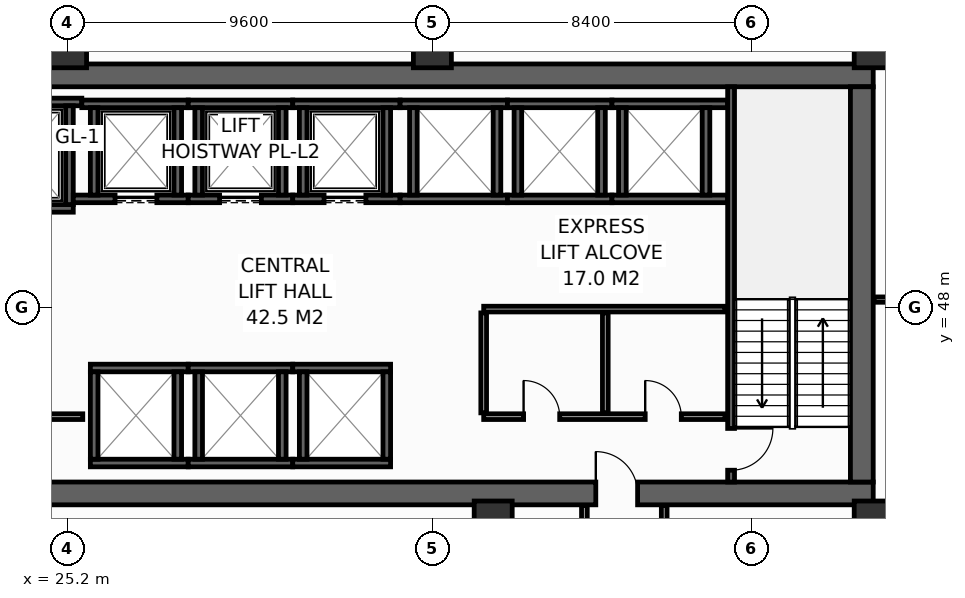
"""IFC4 building model, lengths in metres.
Left out: names, types, materials, properties, quantities, classifications, styles, units other than length and angle.
Written with IfcOpenShell. Run it as: python <this file> out.ifc"""

import sys

from ifc_helpers import new_model, si_unit, direction, frame, frame_2d, origin, origin_2d, place, context, subcontext, project, spatial, rectangle, hollow_rectangle, extrude, element, fill, save


model = new_model("IFC4")
c1 = context("Model", 3, precision=1e-05, world=origin(), true_north=direction((0.0, 1.0)))
c2 = subcontext(c1, "Body", "Model", "MODEL_VIEW")
j1 = project(units=[si_unit("LENGTHUNIT", "METRE"), si_unit("PLANEANGLEUNIT", "RADIAN")], contexts=[c1])
p1 = place(None, origin())
s1 = spatial("IfcSite", under=j1, at=p1, CompositionType="ELEMENT")
p2 = place(p1, origin())
s2 = spatial("IfcBuilding", under=s1, at=p2, CompositionType="ELEMENT")
p3 = place(p2, frame((0.0, 0.0, 101.6)))
s3 = spatial("IfcBuildingStorey", under=s2, at=p3, CompositionType="ELEMENT", Elevation=101.6)
p4 = place(p3, frame((13.5, 43.1, 0.0), z_axis=(0.0, 0.0, 1.0), x_axis=(1.0, 0.0, 0.0)))
e1 = element("IfcWall", 1, at=p4, inside=s3, PredefinedType="SHEAR", context=c2, shape_type="SweptSolid", body=[
    extrude(rectangle(XDim=32.9, YDim=0.6, at=frame_2d((16.45, 0.0))), origin(), (0.0, 0.0, 1.0), 4.15),
])
p5 = place(p4, frame((5.4, 0.0, 0.0)))
e2 = element("IfcOpeningElement", 2, at=p5, cuts=e1, PredefinedType="OPENING", context=c2, shape_type="SweptSolid", body=[
    extrude(rectangle(XDim=1.1, YDim=2.15, at=frame_2d((0.55, 1.075))), frame((0.0, 0.31, 0.0), z_axis=(0.0, -1.0, 0.0), x_axis=(1.0, 0.0, 0.0)), (0.0, 0.0, 1.0), 0.62),
])
p6 = place(p4, frame((25.6, 0.0, 0.0)))
e3 = element("IfcOpeningElement", 3, at=p6, cuts=e1, PredefinedType="OPENING", context=c2, shape_type="SweptSolid", body=[
    extrude(rectangle(XDim=1.1, YDim=2.15, at=frame_2d((0.55, 1.075))), frame((0.0, 0.31, 0.0), z_axis=(0.0, -1.0, 0.0), x_axis=(1.0, 0.0, 0.0)), (0.0, 0.0, 1.0), 0.62),
])
p7 = place(p3, frame((13.5, 54.1, 0.0), z_axis=(0.0, 0.0, 1.0), x_axis=(1.0, 0.0, 0.0)))
e4 = element("IfcWall", 4, at=p7, inside=s3, PredefinedType="SHEAR", context=c2, shape_type="SweptSolid", body=[
    extrude(rectangle(XDim=32.9, YDim=0.6, at=frame_2d((16.45, 0.0))), origin(), (0.0, 0.0, 1.0), 4.15),
])
p8 = place(p3, frame((46.1, 43.4, 0.0), z_axis=(0.0, 0.0, 1.0), x_axis=(0.0, 1.0, 0.0)))
e5 = element("IfcWall", 5, at=p8, inside=s3, PredefinedType="SHEAR", context=c2, shape_type="SweptSolid", body=[
    extrude(rectangle(XDim=10.4, YDim=0.6, at=frame_2d((5.2, 0.0))), origin(), (0.0, 0.0, 1.0), 4.15),
])
for number, where, z_axis, x_axis in (
    (6, (25.2, 54.8, 0.0), (0.0, 0.0, 1.0), (1.0, 0.0, 0.0)),
    (7, (34.8, 54.8, 0.0), (0.0, 0.0, 1.0), (1.0, 0.0, 0.0)),
    (8, (46.4, 54.8, 0.0), (0.0, 0.0, 1.0), (1.0, 0.0, 0.0)),
    (9, (36.4, 42.4, 0.0), (0.0, 0.0, 1.0), (1.0, 0.0, 0.0)),
    (10, (46.4, 42.4, 0.0), (0.0, 0.0, 1.0), (1.0, 0.0, 0.0)),
):
    element("IfcColumn", number, at=place(p3, frame(where, z_axis=z_axis, x_axis=x_axis)), inside=s3, PredefinedType="COLUMN", context=c2, shape_type="SweptSolid", body=[
        extrude(hollow_rectangle(XDim=1.0, YDim=1.0, WallThickness=0.045, at=origin_2d()), origin(), (0.0, 0.0, 1.0), 4.4),
    ])
p9 = place(p3, frame((22.5, 50.6, 0.0), z_axis=(0.0, 0.0, 1.0), x_axis=(1.0, 0.0, 0.0)))
e11 = element("IfcWall", 11, at=p9, inside=s3, PredefinedType="SHEAR", context=c2, shape_type="SweptSolid", body=[
    extrude(rectangle(XDim=2.85, YDim=0.2, at=frame_2d((1.425, 0.0))), origin(), (0.0, 0.0, 1.0), 4.15),
])
p10 = place(p9, frame((0.925, 0.0, 0.0)))
e12 = element("IfcOpeningElement", 12, at=p10, cuts=e11, PredefinedType="OPENING", context=c2, shape_type="SweptSolid", body=[
    extrude(rectangle(XDim=1.25, YDim=2.3, at=frame_2d((0.625, 1.15))), frame((0.0, 0.11, 0.0), z_axis=(0.0, -1.0, 0.0), x_axis=(1.0, 0.0, 0.0)), (0.0, 0.0, 1.0), 0.22),
])
p11 = place(p3, frame((22.5, 53.4, 0.0), z_axis=(0.0, 0.0, 1.0), x_axis=(1.0, 0.0, 0.0)))
e13 = element("IfcWall", 13, at=p11, inside=s3, PredefinedType="SHEAR", context=c2, shape_type="SweptSolid", body=[
    extrude(rectangle(XDim=3.075, YDim=0.2, at=frame_2d((1.538, 0.0))), origin(), (0.0, 0.0, 1.0), 4.15),
])
p12 = place(p3, frame((25.25, 50.7, 0.0), z_axis=(0.0, 0.0, 1.0), x_axis=(0.0, 1.0, 0.0)))
e14 = element("IfcWall", 14, at=p12, inside=s3, PredefinedType="SHEAR", context=c2, shape_type="SweptSolid", body=[
    extrude(rectangle(XDim=2.6, YDim=0.2, at=frame_2d((1.3, 0.0))), origin(), (0.0, 0.0, 1.0), 4.15),
])
p13 = place(p3, frame((25.35, 50.85, 0.0), z_axis=(0.0, 0.0, 1.0), x_axis=(1.0, 0.0, 0.0)))
e15 = element("IfcWall", 15, at=p13, inside=s3, PredefinedType="SHEAR", context=c2, shape_type="SweptSolid", body=[
    extrude(rectangle(XDim=3.025, YDim=0.2, at=frame_2d((1.512, 0.0))), origin(), (0.0, 0.0, 1.0), 4.15),
])
p14 = place(p13, frame((1.1, 0.0, 0.0)))
e16 = element("IfcOpeningElement", 16, at=p14, cuts=e15, PredefinedType="OPENING", context=c2, shape_type="SweptSolid", body=[
    extrude(rectangle(XDim=1.1, YDim=2.2, at=frame_2d((0.55, 1.1))), frame((0.0, 0.11, 0.0), z_axis=(0.0, -1.0, 0.0), x_axis=(1.0, 0.0, 0.0)), (0.0, 0.0, 1.0), 0.22),
])
p15 = place(p3, frame((25.575, 53.35, 0.0), z_axis=(0.0, 0.0, 1.0), x_axis=(1.0, 0.0, 0.0)))
e17 = element("IfcWall", 17, at=p15, inside=s3, PredefinedType="SHEAR", context=c2, shape_type="SweptSolid", body=[
    extrude(rectangle(XDim=2.8, YDim=0.2, at=frame_2d((1.4, 0.0))), origin(), (0.0, 0.0, 1.0), 4.15),
])
for number, where, z_axis, x_axis in (
    (18, (25.9, 50.95, 0.0), (0.0, 0.0, 1.0), (0.0, 1.0, 0.0)),
    (19, (28.1, 50.95, 0.0), (0.0, 0.0, 1.0), (0.0, 1.0, 0.0)),
):
    element("IfcWall", number, at=place(p3, frame(where, z_axis=z_axis, x_axis=x_axis)), inside=s3, PredefinedType="SHEAR", context=c2, shape_type="SweptSolid", body=[
        extrude(rectangle(XDim=2.3, YDim=0.2, at=frame_2d((1.15, 0.0))), origin(), (0.0, 0.0, 1.0), 4.15),
    ])
p16 = place(p3, frame((28.375, 50.85, 0.0), z_axis=(0.0, 0.0, 1.0), x_axis=(1.0, 0.0, 0.0)))
e20 = element("IfcWall", 20, at=p16, inside=s3, PredefinedType="SHEAR", context=c2, shape_type="SweptSolid", body=[
    extrude(rectangle(XDim=2.75, YDim=0.2, at=frame_2d((1.375, 0.0))), origin(), (0.0, 0.0, 1.0), 4.15),
])
p17 = place(p16, frame((0.825, 0.0, 0.0)))
e21 = element("IfcOpeningElement", 21, at=p17, cuts=e20, PredefinedType="OPENING", context=c2, shape_type="SweptSolid", body=[
    extrude(rectangle(XDim=1.1, YDim=2.2, at=frame_2d((0.55, 1.1))), frame((0.0, 0.11, 0.0), z_axis=(0.0, -1.0, 0.0), x_axis=(1.0, 0.0, 0.0)), (0.0, 0.0, 1.0), 0.22),
])
p18 = place(p3, frame((28.375, 53.35, 0.0), z_axis=(0.0, 0.0, 1.0), x_axis=(1.0, 0.0, 0.0)))
e22 = element("IfcWall", 22, at=p18, inside=s3, PredefinedType="SHEAR", context=c2, shape_type="SweptSolid", body=[
    extrude(rectangle(XDim=2.75, YDim=0.2, at=frame_2d((1.375, 0.0))), origin(), (0.0, 0.0, 1.0), 4.15),
])
for number, where, z_axis, x_axis in (
    (23, (28.65, 50.95, 0.0), (0.0, 0.0, 1.0), (0.0, 1.0, 0.0)),
    (24, (30.85, 50.95, 0.0), (0.0, 0.0, 1.0), (0.0, 1.0, 0.0)),
):
    element("IfcWall", number, at=place(p3, frame(where, z_axis=z_axis, x_axis=x_axis)), inside=s3, PredefinedType="SHEAR", context=c2, shape_type="SweptSolid", body=[
        extrude(rectangle(XDim=2.3, YDim=0.2, at=frame_2d((1.15, 0.0))), origin(), (0.0, 0.0, 1.0), 4.15),
    ])
p19 = place(p3, frame((31.125, 50.85, 0.0), z_axis=(0.0, 0.0, 1.0), x_axis=(1.0, 0.0, 0.0)))
e25 = element("IfcWall", 25, at=p19, inside=s3, PredefinedType="SHEAR", context=c2, shape_type="SweptSolid", body=[
    extrude(rectangle(XDim=2.825, YDim=0.2, at=frame_2d((1.413, 0.0))), origin(), (0.0, 0.0, 1.0), 4.15),
])
p20 = place(p19, frame((0.825, 0.0, 0.0)))
e26 = element("IfcOpeningElement", 26, at=p20, cuts=e25, PredefinedType="OPENING", context=c2, shape_type="SweptSolid", body=[
    extrude(rectangle(XDim=1.1, YDim=2.2, at=frame_2d((0.55, 1.1))), frame((0.0, 0.11, 0.0), z_axis=(0.0, -1.0, 0.0), x_axis=(1.0, 0.0, 0.0)), (0.0, 0.0, 1.0), 0.22),
])
p21 = place(p3, frame((31.125, 53.35, 0.0), z_axis=(0.0, 0.0, 1.0), x_axis=(1.0, 0.0, 0.0)))
e27 = element("IfcWall", 27, at=p21, inside=s3, PredefinedType="SHEAR", context=c2, shape_type="SweptSolid", body=[
    extrude(rectangle(XDim=2.825, YDim=0.2, at=frame_2d((1.413, 0.0))), origin(), (0.0, 0.0, 1.0), 4.15),
])
for number, where, z_axis, x_axis in (
    (28, (31.4, 50.95, 0.0), (0.0, 0.0, 1.0), (0.0, 1.0, 0.0)),
    (29, (33.6, 50.95, 0.0), (0.0, 0.0, 1.0), (0.0, 1.0, 0.0)),
):
    element("IfcWall", number, at=place(p3, frame(where, z_axis=z_axis, x_axis=x_axis)), inside=s3, PredefinedType="SHEAR", context=c2, shape_type="SweptSolid", body=[
        extrude(rectangle(XDim=2.3, YDim=0.2, at=frame_2d((1.15, 0.0))), origin(), (0.0, 0.0, 1.0), 4.15),
    ])
for number, where, z_axis, x_axis in (
    (30, (25.8, 43.9, 0.0), (0.0, 0.0, 1.0), (1.0, 0.0, 0.0)),
    (31, (25.8, 46.4, 0.0), (0.0, 0.0, 1.0), (1.0, 0.0, 0.0)),
):
    element("IfcWall", number, at=place(p3, frame(where, z_axis=z_axis, x_axis=x_axis)), inside=s3, PredefinedType="SHEAR", context=c2, shape_type="SweptSolid", body=[
        extrude(rectangle(XDim=2.575, YDim=0.2, at=frame_2d((1.288, 0.0))), origin(), (0.0, 0.0, 1.0), 4.15),
    ])
for number, where, z_axis, x_axis in (
    (32, (25.9, 44.0, 0.0), (0.0, 0.0, 1.0), (0.0, 1.0, 0.0)),
    (33, (28.1, 44.0, 0.0), (0.0, 0.0, 1.0), (0.0, 1.0, 0.0)),
):
    element("IfcWall", number, at=place(p3, frame(where, z_axis=z_axis, x_axis=x_axis)), inside=s3, PredefinedType="SHEAR", context=c2, shape_type="SweptSolid", body=[
        extrude(rectangle(XDim=2.3, YDim=0.2, at=frame_2d((1.15, 0.0))), origin(), (0.0, 0.0, 1.0), 4.15),
    ])
for number, where, z_axis, x_axis in (
    (34, (28.375, 43.9, 0.0), (0.0, 0.0, 1.0), (1.0, 0.0, 0.0)),
    (35, (28.375, 46.4, 0.0), (0.0, 0.0, 1.0), (1.0, 0.0, 0.0)),
):
    element("IfcWall", number, at=place(p3, frame(where, z_axis=z_axis, x_axis=x_axis)), inside=s3, PredefinedType="SHEAR", context=c2, shape_type="SweptSolid", body=[
        extrude(rectangle(XDim=2.75, YDim=0.2, at=frame_2d((1.375, 0.0))), origin(), (0.0, 0.0, 1.0), 4.15),
    ])
for number, where, z_axis, x_axis in (
    (36, (28.65, 44.0, 0.0), (0.0, 0.0, 1.0), (0.0, 1.0, 0.0)),
    (37, (30.85, 44.0, 0.0), (0.0, 0.0, 1.0), (0.0, 1.0, 0.0)),
):
    element("IfcWall", number, at=place(p3, frame(where, z_axis=z_axis, x_axis=x_axis)), inside=s3, PredefinedType="SHEAR", context=c2, shape_type="SweptSolid", body=[
        extrude(rectangle(XDim=2.3, YDim=0.2, at=frame_2d((1.15, 0.0))), origin(), (0.0, 0.0, 1.0), 4.15),
    ])
for number, where, z_axis, x_axis in (
    (38, (31.125, 43.9, 0.0), (0.0, 0.0, 1.0), (1.0, 0.0, 0.0)),
    (39, (31.125, 46.4, 0.0), (0.0, 0.0, 1.0), (1.0, 0.0, 0.0)),
):
    element("IfcWall", number, at=place(p3, frame(where, z_axis=z_axis, x_axis=x_axis)), inside=s3, PredefinedType="SHEAR", context=c2, shape_type="SweptSolid", body=[
        extrude(rectangle(XDim=2.575, YDim=0.2, at=frame_2d((1.288, 0.0))), origin(), (0.0, 0.0, 1.0), 4.15),
    ])
for number, where, z_axis, x_axis in (
    (40, (31.4, 44.0, 0.0), (0.0, 0.0, 1.0), (0.0, 1.0, 0.0)),
    (41, (33.6, 44.0, 0.0), (0.0, 0.0, 1.0), (0.0, 1.0, 0.0)),
):
    element("IfcWall", number, at=place(p3, frame(where, z_axis=z_axis, x_axis=x_axis)), inside=s3, PredefinedType="SHEAR", context=c2, shape_type="SweptSolid", body=[
        extrude(rectangle(XDim=2.3, YDim=0.2, at=frame_2d((1.15, 0.0))), origin(), (0.0, 0.0, 1.0), 4.15),
    ])
for number, where, z_axis, x_axis in (
    (42, (33.95, 50.85, 0.0), (0.0, 0.0, 1.0), (1.0, 0.0, 0.0)),
    (43, (33.95, 53.35, 0.0), (0.0, 0.0, 1.0), (1.0, 0.0, 0.0)),
):
    element("IfcWall", number, at=place(p3, frame(where, z_axis=z_axis, x_axis=x_axis)), inside=s3, PredefinedType="SHEAR", context=c2, shape_type="SweptSolid", body=[
        extrude(rectangle(XDim=2.825, YDim=0.2, at=frame_2d((1.413, 0.0))), origin(), (0.0, 0.0, 1.0), 4.15),
    ])
for number, where, z_axis, x_axis in (
    (44, (34.3, 50.95, 0.0), (0.0, 0.0, 1.0), (0.0, 1.0, 0.0)),
    (45, (36.5, 50.95, 0.0), (0.0, 0.0, 1.0), (0.0, 1.0, 0.0)),
):
    element("IfcWall", number, at=place(p3, frame(where, z_axis=z_axis, x_axis=x_axis)), inside=s3, PredefinedType="SHEAR", context=c2, shape_type="SweptSolid", body=[
        extrude(rectangle(XDim=2.3, YDim=0.2, at=frame_2d((1.15, 0.0))), origin(), (0.0, 0.0, 1.0), 4.15),
    ])
for number, where, z_axis, x_axis in (
    (46, (36.775, 50.85, 0.0), (0.0, 0.0, 1.0), (1.0, 0.0, 0.0)),
    (47, (36.775, 53.35, 0.0), (0.0, 0.0, 1.0), (1.0, 0.0, 0.0)),
):
    element("IfcWall", number, at=place(p3, frame(where, z_axis=z_axis, x_axis=x_axis)), inside=s3, PredefinedType="SHEAR", context=c2, shape_type="SweptSolid", body=[
        extrude(rectangle(XDim=2.75, YDim=0.2, at=frame_2d((1.375, 0.0))), origin(), (0.0, 0.0, 1.0), 4.15),
    ])
for number, where, z_axis, x_axis in (
    (48, (37.05, 50.95, 0.0), (0.0, 0.0, 1.0), (0.0, 1.0, 0.0)),
    (49, (39.25, 50.95, 0.0), (0.0, 0.0, 1.0), (0.0, 1.0, 0.0)),
):
    element("IfcWall", number, at=place(p3, frame(where, z_axis=z_axis, x_axis=x_axis)), inside=s3, PredefinedType="SHEAR", context=c2, shape_type="SweptSolid", body=[
        extrude(rectangle(XDim=2.3, YDim=0.2, at=frame_2d((1.15, 0.0))), origin(), (0.0, 0.0, 1.0), 4.15),
    ])
for number, where, z_axis, x_axis in (
    (50, (39.525, 50.85, 0.0), (0.0, 0.0, 1.0), (1.0, 0.0, 0.0)),
    (51, (39.525, 53.35, 0.0), (0.0, 0.0, 1.0), (1.0, 0.0, 0.0)),
):
    element("IfcWall", number, at=place(p3, frame(where, z_axis=z_axis, x_axis=x_axis)), inside=s3, PredefinedType="SHEAR", context=c2, shape_type="SweptSolid", body=[
        extrude(rectangle(XDim=3.045, YDim=0.2, at=frame_2d((1.522, 0.0))), origin(), (0.0, 0.0, 1.0), 4.15),
    ])
for number, where, z_axis, x_axis in (
    (52, (39.8, 50.95, 0.0), (0.0, 0.0, 1.0), (0.0, 1.0, 0.0)),
    (53, (42.0, 50.95, 0.0), (0.0, 0.0, 1.0), (0.0, 1.0, 0.0)),
):
    element("IfcWall", number, at=place(p3, frame(where, z_axis=z_axis, x_axis=x_axis)), inside=s3, PredefinedType="SHEAR", context=c2, shape_type="SweptSolid", body=[
        extrude(rectangle(XDim=2.3, YDim=0.2, at=frame_2d((1.15, 0.0))), origin(), (0.0, 0.0, 1.0), 4.15),
    ])
p22 = place(p3, frame((42.66, 53.8, 0.0), z_axis=(0.0, 0.0, 1.0), x_axis=(0.0, -1.0, 0.0)))
e54 = element("IfcWall", 54, at=p22, inside=s3, PredefinedType="SHEAR", context=c2, shape_type="SweptSolid", body=[
    extrude(rectangle(XDim=10.4, YDim=0.18, at=frame_2d((5.2, 0.0))), origin(), (0.0, 0.0, 1.0), 4.15),
])
p23 = place(p22, frame((8.99, 0.0, 0.0)))
e55 = element("IfcOpeningElement", 55, at=p23, cuts=e54, PredefinedType="OPENING", context=c2, shape_type="SweptSolid", body=[
    extrude(rectangle(XDim=1.1, YDim=2.15, at=frame_2d((0.55, 1.075))), frame((0.0, 0.1, 0.0), z_axis=(0.0, -1.0, 0.0), x_axis=(1.0, 0.0, 0.0)), (0.0, 0.0, 1.0), 0.2),
])
p24 = place(p3, frame((22.68, 45.12, 0.0), z_axis=(0.0, 0.0, 1.0), x_axis=(1.0, 0.0, 0.0)))
e56 = element("IfcWall", 56, at=p24, inside=s3, PredefinedType="PARTITIONING", context=c2, shape_type="SweptSolid", body=[
    extrude(rectangle(XDim=2.92, YDim=0.15, at=frame_2d((1.46, 0.0))), origin(), (0.0, 0.0, 1.0), 4.15),
])
p25 = place(p24, frame((0.85, 0.0, 0.0)))
e57 = element("IfcOpeningElement", 57, at=p25, cuts=e56, PredefinedType="OPENING", context=c2, shape_type="SweptSolid", body=[
    extrude(rectangle(XDim=1.1, YDim=2.15, at=frame_2d((0.55, 1.075))), frame((0.0, 0.085, 0.0), z_axis=(0.0, -1.0, 0.0), x_axis=(1.0, 0.0, 0.0)), (0.0, 0.0, 1.0), 0.17),
])
p26 = place(p3, frame((36.15, 45.12, 0.0), z_axis=(0.0, 0.0, 1.0), x_axis=(1.0, 0.0, 0.0)))
e58 = element("IfcWall", 58, at=p26, inside=s3, PredefinedType="PARTITIONING", context=c2, shape_type="SweptSolid", body=[
    extrude(rectangle(XDim=6.35, YDim=0.15, at=frame_2d((3.175, 0.0))), origin(), (0.0, 0.0, 1.0), 4.15),
])
p27 = place(p26, frame((1.05, 0.0, 0.0)))
e59 = element("IfcOpeningElement", 59, at=p27, cuts=e58, PredefinedType="OPENING", context=c2, shape_type="SweptSolid", body=[
    extrude(rectangle(XDim=0.95, YDim=2.15, at=frame_2d((0.475, 1.075))), frame((0.0, 0.085, 0.0), z_axis=(0.0, -1.0, 0.0), x_axis=(1.0, 0.0, 0.0)), (0.0, 0.0, 1.0), 0.17),
])
p28 = place(p26, frame((4.25, 0.0, 0.0)))
e60 = element("IfcOpeningElement", 60, at=p28, cuts=e58, PredefinedType="OPENING", context=c2, shape_type="SweptSolid", body=[
    extrude(rectangle(XDim=0.95, YDim=2.15, at=frame_2d((0.475, 1.075))), frame((0.0, 0.085, 0.0), z_axis=(0.0, -1.0, 0.0), x_axis=(1.0, 0.0, 0.0)), (0.0, 0.0, 1.0), 0.17),
])
p29 = place(p3, frame((36.15, 47.95, 0.0), z_axis=(0.0, 0.0, 1.0), x_axis=(1.0, 0.0, 0.0)))
e61 = element("IfcWall", 61, at=p29, inside=s3, PredefinedType="PARTITIONING", context=c2, shape_type="SweptSolid", body=[
    extrude(rectangle(XDim=6.35, YDim=0.15, at=frame_2d((3.175, 0.0))), origin(), (0.0, 0.0, 1.0), 4.15),
])
for number, where, z_axis, x_axis in (
    (62, (36.15, 45.22, 0.0), (0.0, 0.0, 1.0), (0.0, 1.0, 0.0)),
    (63, (39.35, 45.22, 0.0), (0.0, 0.0, 1.0), (0.0, 1.0, 0.0)),
):
    element("IfcWall", number, at=place(p3, frame(where, z_axis=z_axis, x_axis=x_axis)), inside=s3, PredefinedType="PARTITIONING", context=c2, shape_type="SweptSolid", body=[
        extrude(rectangle(XDim=2.63, YDim=0.15, at=frame_2d((1.315, 0.0))), origin(), (0.0, 0.0, 1.0), 4.15),
    ])
p30 = place(p3, frame((46.15, 41.24, 0.0), z_axis=(0.0, 0.0, 1.0), x_axis=(0.0, 1.0, 0.0)))
e64 = element("IfcWall", 64, at=p30, inside=s3, PredefinedType="PARTITIONING", context=c2, shape_type="SweptSolid", body=[
    extrude(rectangle(XDim=1.54, YDim=0.14, at=frame_2d((0.77, 0.0))), origin(), (0.0, 0.0, 1.0), 4.15),
])
p31 = place(p3, frame((46.42, 48.2, 0.0), z_axis=(0.0, 0.0, 1.0), x_axis=(1.0, 0.0, 0.0)))
e65 = element("IfcWall", 65, at=p31, inside=s3, PredefinedType="PARTITIONING", context=c2, shape_type="SweptSolid", body=[
    extrude(rectangle(XDim=3.78, YDim=0.14, at=frame_2d((1.89, 0.0))), origin(), (0.0, 0.0, 1.0), 4.15),
])
for number, where, z_axis, x_axis in (
    (66, (38.8, 41.15, 0.0), (0.0, 0.0, 1.0), (0.0, 1.0, 0.0)),
    (67, (40.9, 41.15, 0.0), (0.0, 0.0, 1.0), (0.0, 1.0, 0.0)),
):
    element("IfcWall", number, at=place(p3, frame(where, z_axis=z_axis, x_axis=x_axis)), inside=s3, PredefinedType="PARTITIONING", context=c2, shape_type="SweptSolid", body=[
        extrude(rectangle(XDim=1.63, YDim=0.15, at=frame_2d((0.815, 0.0))), origin(), (0.0, 0.0, 1.0), 4.15),
    ])
p32 = place(p14, origin())
e68 = element("IfcDoor", 68, at=p32, inside=s3, OperationType="SLIDING_TO_LEFT", PredefinedType="DOOR", context=c2, shape_type="SweptSolid", body=[
    extrude(rectangle(XDim=1.1, YDim=2.2, at=frame_2d((0.55, 1.1))), frame((0.0, 0.025, 0.0), z_axis=(0.0, -1.0, 0.0), x_axis=(1.0, 0.0, 0.0)), (0.0, 0.0, 1.0), 0.05),
])
fill(e16, e68)
p33 = place(p17, origin())
e69 = element("IfcDoor", 69, at=p33, inside=s3, OperationType="SLIDING_TO_LEFT", PredefinedType="DOOR", context=c2, shape_type="SweptSolid", body=[
    extrude(rectangle(XDim=1.1, YDim=2.2, at=frame_2d((0.55, 1.1))), frame((0.0, 0.025, 0.0), z_axis=(0.0, -1.0, 0.0), x_axis=(1.0, 0.0, 0.0)), (0.0, 0.0, 1.0), 0.05),
])
fill(e21, e69)
p34 = place(p20, origin())
e70 = element("IfcDoor", 70, at=p34, inside=s3, OperationType="SLIDING_TO_LEFT", PredefinedType="DOOR", context=c2, shape_type="SweptSolid", body=[
    extrude(rectangle(XDim=1.1, YDim=2.2, at=frame_2d((0.55, 1.1))), frame((0.0, 0.025, 0.0), z_axis=(0.0, -1.0, 0.0), x_axis=(1.0, 0.0, 0.0)), (0.0, 0.0, 1.0), 0.05),
])
fill(e26, e70)
p35 = place(p23, origin())
e71 = element("IfcDoor", 71, at=p35, inside=s3, OperationType="SINGLE_SWING_LEFT", PredefinedType="DOOR", context=c2, shape_type="SweptSolid", body=[
    extrude(rectangle(XDim=1.1, YDim=2.15, at=frame_2d((0.55, 1.075))), frame((0.0, 0.025, 0.0), z_axis=(0.0, -1.0, 0.0), x_axis=(1.0, 0.0, 0.0)), (0.0, 0.0, 1.0), 0.05),
])
fill(e55, e71)
p36 = place(p6, origin())
e72 = element("IfcDoor", 72, at=p36, inside=s3, OperationType="SINGLE_SWING_LEFT", PredefinedType="DOOR", context=c2, shape_type="SweptSolid", body=[
    extrude(rectangle(XDim=1.1, YDim=2.15, at=frame_2d((0.55, 1.075))), frame((0.0, 0.025, 0.0), z_axis=(0.0, -1.0, 0.0), x_axis=(1.0, 0.0, 0.0)), (0.0, 0.0, 1.0), 0.05),
])
fill(e3, e72)
p37 = place(p27, origin())
e73 = element("IfcDoor", 73, at=p37, inside=s3, OperationType="SINGLE_SWING_LEFT", PredefinedType="DOOR", context=c2, shape_type="SweptSolid", body=[
    extrude(rectangle(XDim=0.95, YDim=2.15, at=frame_2d((0.475, 1.075))), frame((0.0, 0.025, 0.0), z_axis=(0.0, -1.0, 0.0), x_axis=(1.0, 0.0, 0.0)), (0.0, 0.0, 1.0), 0.05),
])
fill(e59, e73)
p38 = place(p28, origin())
e74 = element("IfcDoor", 74, at=p38, inside=s3, OperationType="SINGLE_SWING_LEFT", PredefinedType="DOOR", context=c2, shape_type="SweptSolid", body=[
    extrude(rectangle(XDim=0.95, YDim=2.15, at=frame_2d((0.475, 1.075))), frame((0.0, 0.025, 0.0), z_axis=(0.0, -1.0, 0.0), x_axis=(1.0, 0.0, 0.0)), (0.0, 0.0, 1.0), 0.05),
])
fill(e60, e74)
save(model, sys.argv[1])
